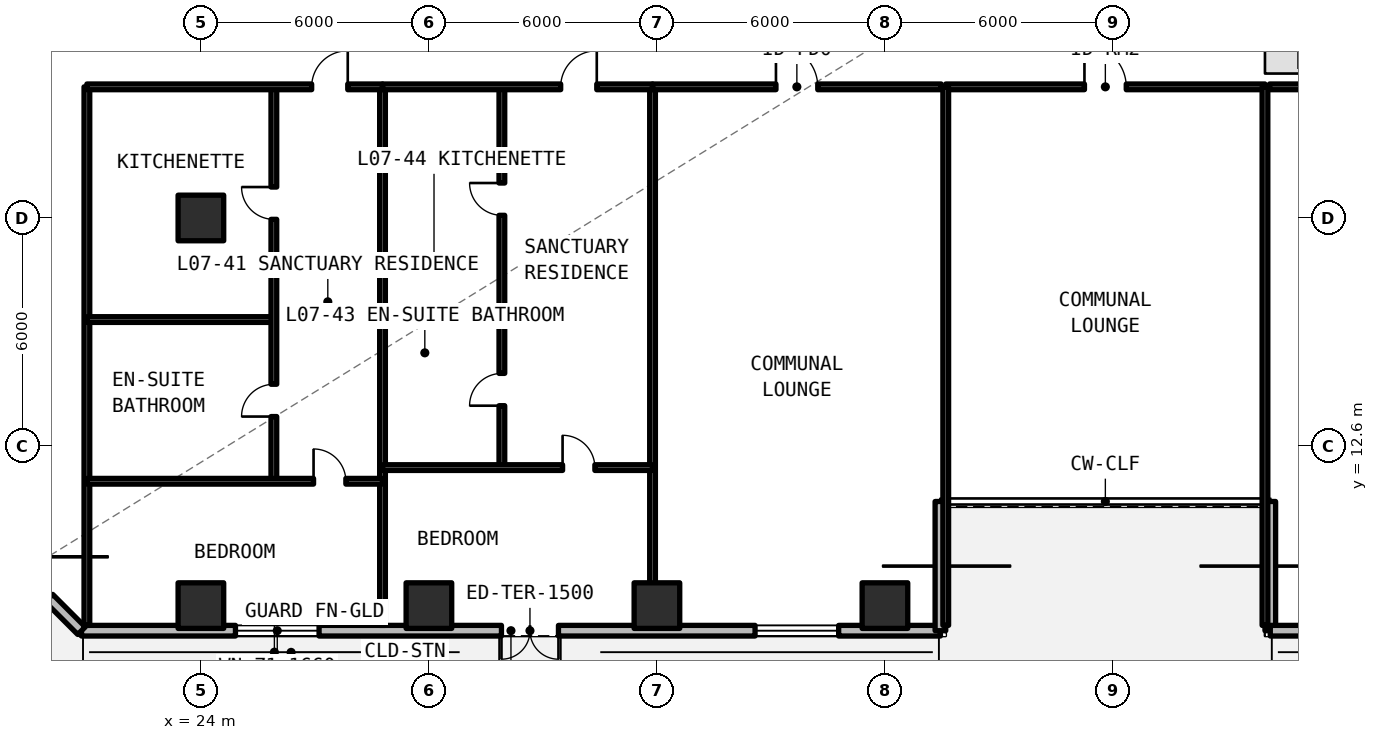
"""IFC4 building model, lengths in metres.
Left out: names, types, materials, properties, quantities, classifications, styles, units other than length and angle.
Written with IfcOpenShell. Run it as: python <this file> out.ifc"""

import sys

from ifc_helpers import new_model, si_unit, direction, frame, frame_2d, origin, origin_2d, place, context, subcontext, project, spatial, rectangle, extrude, element, fill, save


model = new_model("IFC4")
c1 = context("Model", 3, precision=1e-05, world=origin(), true_north=direction((0.0, 1.0)))
c2 = subcontext(c1, "Body", "Model", "MODEL_VIEW")
j1 = project(units=[si_unit("LENGTHUNIT", "METRE"), si_unit("PLANEANGLEUNIT", "RADIAN")], contexts=[c1])
p1 = place(None, origin())
s1 = spatial("IfcSite", under=j1, at=p1, CompositionType="ELEMENT")
p2 = place(p1, origin())
s2 = spatial("IfcBuilding", under=s1, at=p2, CompositionType="ELEMENT")
p3 = place(p2, frame((0.0, 0.0, 29.04)))
s3 = spatial("IfcBuildingStorey", under=s2, at=p3, CompositionType="ELEMENT", Elevation=29.04)
p4 = place(p3, frame((24.0, 18.6, 0.0), z_axis=(0.0, 0.0, 1.0), x_axis=(1.0, 0.0, 0.0)))
e1 = element("IfcColumn", 1, at=p4, inside=s3, PredefinedType="COLUMN", context=c2, shape_type="SweptSolid", body=[
    extrude(rectangle(XDim=1.2, YDim=1.2, at=origin_2d()), origin(), (0.0, 0.0, 1.0), 3.3),
])
for number, where, z_axis, x_axis in (
    (2, (24.0, 8.4, -0.24), (0.0, 0.0, 1.0), (1.0, 0.0, 0.0)),
    (3, (30.0, 8.4, -0.24), (0.0, 0.0, 1.0), (1.0, 0.0, 0.0)),
    (4, (36.0, 8.4, -0.24), (0.0, 0.0, 1.0), (1.0, 0.0, 0.0)),
    (5, (42.0, 8.4, -0.24), (0.0, 0.0, 1.0), (1.0, 0.0, 0.0)),
):
    element("IfcColumn", number, at=place(p3, frame(where, z_axis=z_axis, x_axis=x_axis)), inside=s3, PredefinedType="COLUMN", context=c2, shape_type="SweptSolid", body=[
        extrude(rectangle(XDim=1.2, YDim=1.2, at=origin_2d()), origin(), (0.0, 0.0, 1.0), 3.54),
    ])
p5 = place(p3, frame((20.858, 7.74, 0.0), z_axis=(0.0, 0.0, 1.0), x_axis=(1.0, 0.0, 0.0)))
e6 = element("IfcWall", 6, at=p5, inside=s3, PredefinedType="SOLIDWALL", context=c2, shape_type="SweptSolid", body=[
    extrude(rectangle(XDim=22.602, YDim=0.28, at=frame_2d((11.301, 0.0))), origin(), (0.0, 0.0, 1.0), 3.08),
])
p6 = place(p5, frame((11.051, 0.0, 0.0)))
e7 = element("IfcOpeningElement", 7, at=p6, cuts=e6, PredefinedType="OPENING", context=c2, shape_type="SweptSolid", body=[
    extrude(rectangle(XDim=1.5, YDim=2.2, at=frame_2d((0.75, 1.1))), frame((0.0, 0.15, 0.0), z_axis=(0.0, -1.0, 0.0), x_axis=(1.0, 0.0, 0.0)), (0.0, 0.0, 1.0), 0.3),
])
p7 = place(p5, frame((4.052, 0.0, 0.78)))
e8 = element("IfcOpeningElement", 8, at=p7, cuts=e6, PredefinedType="OPENING", context=c2, shape_type="SweptSolid", body=[
    extrude(rectangle(XDim=2.2, YDim=1.66, at=frame_2d((1.1, 0.83))), frame((0.0, 0.15, 0.0), z_axis=(0.0, -1.0, 0.0), x_axis=(1.0, 0.0, 0.0)), (0.0, 0.0, 1.0), 0.3),
])
p8 = place(p5, frame((17.724, 0.0, 0.78)))
e9 = element("IfcOpeningElement", 9, at=p8, cuts=e6, PredefinedType="OPENING", context=c2, shape_type="SweptSolid", body=[
    extrude(rectangle(XDim=2.2, YDim=1.66, at=frame_2d((1.1, 0.83))), frame((0.0, 0.15, 0.0), z_axis=(0.0, -1.0, 0.0), x_axis=(1.0, 0.0, 0.0)), (0.0, 0.0, 1.0), 0.3),
])
for number, where, z_axis, x_axis in (
    (10, (43.46, 7.74, 0.0), (0.0, 0.0, 1.0), (0.0, 1.0, 0.0)),
    (11, (52.14, 11.14, 0.0), (0.0, 0.0, 1.0), (0.0, -1.0, 0.0)),
):
    element("IfcWall", number, at=place(p3, frame(where, z_axis=z_axis, x_axis=x_axis)), inside=s3, PredefinedType="SOLIDWALL", context=c2, shape_type="SweptSolid", body=[
        extrude(rectangle(XDim=3.4, YDim=0.28, at=frame_2d((1.7, 0.0))), origin(), (0.0, 0.0, 1.0), 3.08),
    ])
p9 = place(p3, frame((52.14, 7.74, 0.0), z_axis=(0.0, 0.0, 1.0), x_axis=(1.0, 0.0, 0.0)))
e12 = element("IfcWall", 12, at=p9, inside=s3, PredefinedType="SOLIDWALL", context=c2, shape_type="SweptSolid", body=[
    extrude(rectangle(XDim=44.402, YDim=0.28, at=frame_2d((22.201, 0.0))), origin(), (0.0, 0.0, 1.0), 3.08),
])
p10 = place(p9, frame((2.664, 0.0, 0.78)))
e13 = element("IfcOpeningElement", 13, at=p10, cuts=e12, PredefinedType="OPENING", context=c2, shape_type="SweptSolid", body=[
    extrude(rectangle(XDim=2.2, YDim=1.66, at=frame_2d((1.1, 0.83))), frame((0.0, 0.15, 0.0), z_axis=(0.0, -1.0, 0.0), x_axis=(1.0, 0.0, 0.0)), (0.0, 0.0, 1.0), 0.3),
])
p11 = place(p9, frame((8.967, 0.0, 0.78)))
e14 = element("IfcOpeningElement", 14, at=p11, cuts=e12, PredefinedType="OPENING", context=c2, shape_type="SweptSolid", body=[
    extrude(rectangle(XDim=2.2, YDim=1.66, at=frame_2d((1.1, 0.83))), frame((0.0, 0.15, 0.0), z_axis=(0.0, -1.0, 0.0), x_axis=(1.0, 0.0, 0.0)), (0.0, 0.0, 1.0), 0.3),
])
p12 = place(p9, frame((16.566, 0.0, 0.78)))
e15 = element("IfcOpeningElement", 15, at=p12, cuts=e12, PredefinedType="OPENING", context=c2, shape_type="SweptSolid", body=[
    extrude(rectangle(XDim=2.2, YDim=1.66, at=frame_2d((1.1, 0.83))), frame((0.0, 0.15, 0.0), z_axis=(0.0, -1.0, 0.0), x_axis=(1.0, 0.0, 0.0)), (0.0, 0.0, 1.0), 0.3),
])
p13 = place(p9, frame((22.826, 0.0, 0.78)))
e16 = element("IfcOpeningElement", 16, at=p13, cuts=e12, PredefinedType="OPENING", context=c2, shape_type="SweptSolid", body=[
    extrude(rectangle(XDim=2.2, YDim=1.66, at=frame_2d((1.1, 0.83))), frame((0.0, 0.15, 0.0), z_axis=(0.0, -1.0, 0.0), x_axis=(1.0, 0.0, 0.0)), (0.0, 0.0, 1.0), 0.3),
])
p14 = place(p9, frame((32.766, 0.0, 0.78)))
e17 = element("IfcOpeningElement", 17, at=p14, cuts=e12, PredefinedType="OPENING", context=c2, shape_type="SweptSolid", body=[
    extrude(rectangle(XDim=2.2, YDim=1.66, at=frame_2d((1.1, 0.83))), frame((0.0, 0.15, 0.0), z_axis=(0.0, -1.0, 0.0), x_axis=(1.0, 0.0, 0.0)), (0.0, 0.0, 1.0), 0.3),
])
p15 = place(p9, frame((38.548, 0.0, 0.78)))
e18 = element("IfcOpeningElement", 18, at=p15, cuts=e12, PredefinedType="OPENING", context=c2, shape_type="SweptSolid", body=[
    extrude(rectangle(XDim=0.85, YDim=1.65, at=frame_2d((0.425, 0.825))), frame((0.0, 0.15, 0.0), z_axis=(0.0, -1.0, 0.0), x_axis=(1.0, 0.0, 0.0)), (0.0, 0.0, 1.0), 0.3),
])
p16 = place(p9, frame((40.91, 0.0, 0.78)))
e19 = element("IfcOpeningElement", 19, at=p16, cuts=e12, PredefinedType="OPENING", context=c2, shape_type="SweptSolid", body=[
    extrude(rectangle(XDim=2.2, YDim=1.66, at=frame_2d((1.1, 0.83))), frame((0.0, 0.15, 0.0), z_axis=(0.0, -1.0, 0.0), x_axis=(1.0, 0.0, 0.0)), (0.0, 0.0, 1.0), 0.3),
])
p17 = place(p3, frame((16.74, 11.858, 0.0), z_axis=(0.0, 0.0, 1.0), x_axis=(0.707106781187, -0.707106781187, 0.0)))
e20 = element("IfcWall", 20, at=p17, inside=s3, PredefinedType="SOLIDWALL", context=c2, shape_type="SweptSolid", body=[
    extrude(rectangle(XDim=5.824, YDim=0.28, at=frame_2d((2.912, 0.0))), origin(), (0.0, 0.0, 1.0), 3.08),
])
p18 = place(p17, frame((1.212, 0.0, 0.78)))
e21 = element("IfcOpeningElement", 21, at=p18, cuts=e20, PredefinedType="OPENING", context=c2, shape_type="SweptSolid", body=[
    extrude(rectangle(XDim=3.4, YDim=1.66, at=frame_2d((1.7, 0.83))), frame((0.0, 0.15, 0.0), z_axis=(0.0, -1.0, 0.0), x_axis=(1.0, 0.0, 0.0)), (0.0, 0.0, 1.0), 0.3),
])
p19 = place(p3, frame((43.6, 22.05, 0.0), z_axis=(0.0, 0.0, 1.0), x_axis=(1.0, 0.0, 0.0)))
e22 = element("IfcWall", 22, at=p19, inside=s3, PredefinedType="SOLIDWALL", context=c2, shape_type="SweptSolid", body=[
    extrude(rectangle(XDim=8.4, YDim=0.15, at=frame_2d((4.2, 0.0))), origin(), (0.0, 0.0, 1.0), 2.35),
])
p20 = place(p19, frame((3.65, 0.0, 0.0)))
e23 = element("IfcOpeningElement", 23, at=p20, cuts=e22, PredefinedType="OPENING", context=c2, shape_type="SweptSolid", body=[
    extrude(rectangle(XDim=1.1, YDim=2.15, at=frame_2d((0.55, 1.075))), frame((0.0, 0.085, 0.0), z_axis=(0.0, -1.0, 0.0), x_axis=(1.0, 0.0, 0.0)), (0.0, 0.0, 1.0), 0.17),
])
for number, where, z_axis, x_axis in (
    (24, (43.6, 7.88, 0.0), (0.0, 0.0, 1.0), (0.0, 1.0, 0.0)),
    (25, (52.0, 7.88, 0.0), (0.0, 0.0, 1.0), (0.0, 1.0, 0.0)),
    (26, (21.0, 7.88, 0.0), (0.0, 0.0, 1.0), (0.0, 1.0, 0.0)),
    (27, (28.779, 7.88, 0.0), (0.0, 0.0, 1.0), (0.0, 1.0, 0.0)),
):
    element("IfcWall", number, at=place(p3, frame(where, z_axis=z_axis, x_axis=x_axis)), inside=s3, PredefinedType="SOLIDWALL", context=c2, shape_type="SweptSolid", body=[
        extrude(rectangle(XDim=14.17, YDim=0.15, at=frame_2d((7.085, 0.0))), origin(), (0.0, 0.0, 1.0), 2.35),
    ])
p21 = place(p3, frame((21.0, 15.927, 0.0), z_axis=(0.0, 0.0, 1.0), x_axis=(1.0, 0.0, 0.0)))
e28 = element("IfcWall", 28, at=p21, inside=s3, PredefinedType="PARTITIONING", context=c2, shape_type="SweptSolid", body=[
    extrude(rectangle(XDim=4.92, YDim=0.15, at=frame_2d((2.46, 0.0))), origin(), (0.0, 0.0, 1.0), 2.35),
])
p22 = place(p3, frame((25.92, 11.672, 0.0), z_axis=(0.0, 0.0, 1.0), x_axis=(0.0, 1.0, 0.0)))
e29 = element("IfcWall", 29, at=p22, inside=s3, PredefinedType="PARTITIONING", context=c2, shape_type="SweptSolid", body=[
    extrude(rectangle(XDim=10.378, YDim=0.15, at=frame_2d((5.189, 0.0))), origin(), (0.0, 0.0, 1.0), 2.35),
])
p23 = place(p22, frame((1.702, 0.0, 0.0)))
e30 = element("IfcOpeningElement", 30, at=p23, cuts=e29, PredefinedType="OPENING", context=c2, shape_type="SweptSolid", body=[
    extrude(rectangle(XDim=0.85, YDim=2.1, at=frame_2d((0.425, 1.05))), frame((0.0, 0.085, 0.0), z_axis=(0.0, -1.0, 0.0), x_axis=(1.0, 0.0, 0.0)), (0.0, 0.0, 1.0), 0.17),
])
p24 = place(p22, frame((6.891, 0.0, 0.0)))
e31 = element("IfcOpeningElement", 31, at=p24, cuts=e29, PredefinedType="OPENING", context=c2, shape_type="SweptSolid", body=[
    extrude(rectangle(XDim=0.85, YDim=2.1, at=frame_2d((0.425, 1.05))), frame((0.0, 0.085, 0.0), z_axis=(0.0, -1.0, 0.0), x_axis=(1.0, 0.0, 0.0)), (0.0, 0.0, 1.0), 0.17),
])
p25 = place(p3, frame((21.0, 11.672, 0.0), z_axis=(0.0, 0.0, 1.0), x_axis=(1.0, 0.0, 0.0)))
e32 = element("IfcWall", 32, at=p25, inside=s3, PredefinedType="PARTITIONING", context=c2, shape_type="SweptSolid", body=[
    extrude(rectangle(XDim=7.779, YDim=0.15, at=frame_2d((3.89, 0.0))), origin(), (0.0, 0.0, 1.0), 2.35),
])
p26 = place(p25, frame((5.965, 0.0, 0.0)))
e33 = element("IfcOpeningElement", 33, at=p26, cuts=e32, PredefinedType="OPENING", context=c2, shape_type="SweptSolid", body=[
    extrude(rectangle(XDim=0.85, YDim=2.1, at=frame_2d((0.425, 1.05))), frame((0.0, 0.085, 0.0), z_axis=(0.0, -1.0, 0.0), x_axis=(1.0, 0.0, 0.0)), (0.0, 0.0, 1.0), 0.17),
])
p27 = place(p3, frame((21.0, 22.05, 0.0), z_axis=(0.0, 0.0, 1.0), x_axis=(1.0, 0.0, 0.0)))
e34 = element("IfcWall", 34, at=p27, inside=s3, PredefinedType="SOLIDWALL", context=c2, shape_type="SweptSolid", body=[
    extrude(rectangle(XDim=7.779, YDim=0.15, at=frame_2d((3.89, 0.0))), origin(), (0.0, 0.0, 1.0), 2.35),
])
p28 = place(p27, frame((5.915, 0.0, 0.0)))
e35 = element("IfcOpeningElement", 35, at=p28, cuts=e34, PredefinedType="OPENING", context=c2, shape_type="SweptSolid", body=[
    extrude(rectangle(XDim=0.95, YDim=2.15, at=frame_2d((0.475, 1.075))), frame((0.0, 0.085, 0.0), z_axis=(0.0, -1.0, 0.0), x_axis=(1.0, 0.0, 0.0)), (0.0, 0.0, 1.0), 0.17),
])
p29 = place(p3, frame((35.885, 7.88, 0.0), z_axis=(0.0, 0.0, 1.0), x_axis=(0.0, 1.0, 0.0)))
e36 = element("IfcWall", 36, at=p29, inside=s3, PredefinedType="SOLIDWALL", context=c2, shape_type="SweptSolid", body=[
    extrude(rectangle(XDim=14.17, YDim=0.15, at=frame_2d((7.085, 0.0))), origin(), (0.0, 0.0, 1.0), 2.35),
])
p30 = place(p3, frame((28.779, 16.139, 0.0), z_axis=(0.0, 0.0, 1.0), x_axis=(1.0, 0.0, 0.0)))
e37 = element("IfcWall", 37, at=p30, inside=s3, PredefinedType="PARTITIONING", context=c2, shape_type="SweptSolid", body=[
    extrude(rectangle(XDim=3.141, YDim=0.15, at=frame_2d((1.57, 0.0))), origin(), (0.0, 0.0, 1.0), 2.35),
])
p31 = place(p3, frame((31.92, 12.032, 0.0), z_axis=(0.0, 0.0, 1.0), x_axis=(0.0, 1.0, 0.0)))
e38 = element("IfcWall", 38, at=p31, inside=s3, PredefinedType="PARTITIONING", context=c2, shape_type="SweptSolid", body=[
    extrude(rectangle(XDim=10.018, YDim=0.15, at=frame_2d((5.009, 0.0))), origin(), (0.0, 0.0, 1.0), 2.35),
])
p32 = place(p31, frame((1.629, 0.0, 0.0)))
e39 = element("IfcOpeningElement", 39, at=p32, cuts=e38, PredefinedType="OPENING", context=c2, shape_type="SweptSolid", body=[
    extrude(rectangle(XDim=0.85, YDim=2.1, at=frame_2d((0.425, 1.05))), frame((0.0, 0.085, 0.0), z_axis=(0.0, -1.0, 0.0), x_axis=(1.0, 0.0, 0.0)), (0.0, 0.0, 1.0), 0.17),
])
p33 = place(p31, frame((6.638, 0.0, 0.0)))
e40 = element("IfcOpeningElement", 40, at=p33, cuts=e38, PredefinedType="OPENING", context=c2, shape_type="SweptSolid", body=[
    extrude(rectangle(XDim=0.85, YDim=2.1, at=frame_2d((0.425, 1.05))), frame((0.0, 0.085, 0.0), z_axis=(0.0, -1.0, 0.0), x_axis=(1.0, 0.0, 0.0)), (0.0, 0.0, 1.0), 0.17),
])
p34 = place(p3, frame((28.779, 12.032, 0.0), z_axis=(0.0, 0.0, 1.0), x_axis=(1.0, 0.0, 0.0)))
e41 = element("IfcWall", 41, at=p34, inside=s3, PredefinedType="PARTITIONING", context=c2, shape_type="SweptSolid", body=[
    extrude(rectangle(XDim=7.105, YDim=0.15, at=frame_2d((3.553, 0.0))), origin(), (0.0, 0.0, 1.0), 2.35),
])
p35 = place(p34, frame((4.738, 0.0, 0.0)))
e42 = element("IfcOpeningElement", 42, at=p35, cuts=e41, PredefinedType="OPENING", context=c2, shape_type="SweptSolid", body=[
    extrude(rectangle(XDim=0.85, YDim=2.1, at=frame_2d((0.425, 1.05))), frame((0.0, 0.085, 0.0), z_axis=(0.0, -1.0, 0.0), x_axis=(1.0, 0.0, 0.0)), (0.0, 0.0, 1.0), 0.17),
])
p36 = place(p3, frame((28.779, 22.05, 0.0), z_axis=(0.0, 0.0, 1.0), x_axis=(1.0, 0.0, 0.0)))
e43 = element("IfcWall", 43, at=p36, inside=s3, PredefinedType="SOLIDWALL", context=c2, shape_type="SweptSolid", body=[
    extrude(rectangle(XDim=7.105, YDim=0.15, at=frame_2d((3.553, 0.0))), origin(), (0.0, 0.0, 1.0), 2.35),
])
p37 = place(p36, frame((4.688, 0.0, 0.0)))
e44 = element("IfcOpeningElement", 44, at=p37, cuts=e43, PredefinedType="OPENING", context=c2, shape_type="SweptSolid", body=[
    extrude(rectangle(XDim=0.95, YDim=2.15, at=frame_2d((0.475, 1.075))), frame((0.0, 0.085, 0.0), z_axis=(0.0, -1.0, 0.0), x_axis=(1.0, 0.0, 0.0)), (0.0, 0.0, 1.0), 0.17),
])
p38 = place(p3, frame((35.885, 22.05, 0.0), z_axis=(0.0, 0.0, 1.0), x_axis=(1.0, 0.0, 0.0)))
e45 = element("IfcWall", 45, at=p38, inside=s3, PredefinedType="SOLIDWALL", context=c2, shape_type="SweptSolid", body=[
    extrude(rectangle(XDim=7.595, YDim=0.15, at=frame_2d((3.798, 0.0))), origin(), (0.0, 0.0, 1.0), 2.35),
])
p39 = place(p38, frame((3.248, 0.0, 0.0)))
e46 = element("IfcOpeningElement", 46, at=p39, cuts=e45, PredefinedType="OPENING", context=c2, shape_type="SweptSolid", body=[
    extrude(rectangle(XDim=1.1, YDim=2.15, at=frame_2d((0.55, 1.075))), frame((0.0, 0.085, 0.0), z_axis=(0.0, -1.0, 0.0), x_axis=(1.0, 0.0, 0.0)), (0.0, 0.0, 1.0), 0.17),
])
p40 = place(p3, frame((52.12, 22.05, 0.0), z_axis=(0.0, 0.0, 1.0), x_axis=(1.0, 0.0, 0.0)))
e47 = element("IfcWall", 47, at=p40, inside=s3, PredefinedType="SOLIDWALL", context=c2, shape_type="SweptSolid", body=[
    extrude(rectangle(XDim=6.288, YDim=0.15, at=frame_2d((3.144, 0.0))), origin(), (0.0, 0.0, 1.0), 2.35),
])
p41 = place(p40, frame((2.669, 0.0, 0.0)))
e48 = element("IfcOpeningElement", 48, at=p41, cuts=e47, PredefinedType="OPENING", context=c2, shape_type="SweptSolid", body=[
    extrude(rectangle(XDim=0.95, YDim=2.15, at=frame_2d((0.475, 1.075))), frame((0.0, 0.085, 0.0), z_axis=(0.0, -1.0, 0.0), x_axis=(1.0, 0.0, 0.0)), (0.0, 0.0, 1.0), 0.17),
])
p42 = place(p6, frame((1.5, 0.0, 0.0), z_axis=(0.0, 0.0, 1.0), x_axis=(-1.0, 0.0, 0.0)))
e49 = element("IfcDoor", 49, at=p42, inside=s3, OperationType="SINGLE_SWING_RIGHT", PredefinedType="DOOR", context=c2, shape_type="SweptSolid", body=[
    extrude(rectangle(XDim=1.5, YDim=2.2, at=frame_2d((0.75, 1.1))), frame((0.0, 0.025, 0.0), z_axis=(0.0, -1.0, 0.0), x_axis=(1.0, 0.0, 0.0)), (0.0, 0.0, 1.0), 0.05),
])
fill(e7, e49)
p43 = place(p7, origin())
e50 = element("IfcWindow", 50, at=p43, inside=s3, PartitioningType="SINGLE_PANEL", PredefinedType="WINDOW", context=c2, shape_type="SweptSolid", body=[
    extrude(rectangle(XDim=2.2, YDim=1.66, at=frame_2d((1.1, 0.83))), frame((0.0, 0.03, 0.0), z_axis=(0.0, -1.0, 0.0), x_axis=(1.0, 0.0, 0.0)), (0.0, 0.0, 1.0), 0.06),
])
fill(e8, e50)
p44 = place(p8, origin())
e51 = element("IfcWindow", 51, at=p44, inside=s3, PartitioningType="SINGLE_PANEL", PredefinedType="WINDOW", context=c2, shape_type="SweptSolid", body=[
    extrude(rectangle(XDim=2.2, YDim=1.66, at=frame_2d((1.1, 0.83))), frame((0.0, 0.03, 0.0), z_axis=(0.0, -1.0, 0.0), x_axis=(1.0, 0.0, 0.0)), (0.0, 0.0, 1.0), 0.06),
])
fill(e9, e51)
p45 = place(p20, origin())
e52 = element("IfcDoor", 52, at=p45, inside=s3, OperationType="SINGLE_SWING_LEFT", PredefinedType="DOOR", context=c2, shape_type="SweptSolid", body=[
    extrude(rectangle(XDim=1.1, YDim=2.15, at=frame_2d((0.55, 1.075))), frame((0.0, 0.025, 0.0), z_axis=(0.0, -1.0, 0.0), x_axis=(1.0, 0.0, 0.0)), (0.0, 0.0, 1.0), 0.05),
])
fill(e23, e52)
p46 = place(p23, origin())
e53 = element("IfcDoor", 53, at=p46, inside=s3, OperationType="SINGLE_SWING_LEFT", PredefinedType="DOOR", context=c2, shape_type="SweptSolid", body=[
    extrude(rectangle(XDim=0.85, YDim=2.1, at=frame_2d((0.425, 1.05))), frame((0.0, 0.025, 0.0), z_axis=(0.0, -1.0, 0.0), x_axis=(1.0, 0.0, 0.0)), (0.0, 0.0, 1.0), 0.05),
])
fill(e30, e53)
p47 = place(p24, origin())
e54 = element("IfcDoor", 54, at=p47, inside=s3, OperationType="SINGLE_SWING_RIGHT", PredefinedType="DOOR", context=c2, shape_type="SweptSolid", body=[
    extrude(rectangle(XDim=0.85, YDim=2.1, at=frame_2d((0.425, 1.05))), frame((0.0, 0.025, 0.0), z_axis=(0.0, -1.0, 0.0), x_axis=(1.0, 0.0, 0.0)), (0.0, 0.0, 1.0), 0.05),
])
fill(e31, e54)
p48 = place(p26, origin())
e55 = element("IfcDoor", 55, at=p48, inside=s3, OperationType="SINGLE_SWING_LEFT", PredefinedType="DOOR", context=c2, shape_type="SweptSolid", body=[
    extrude(rectangle(XDim=0.85, YDim=2.1, at=frame_2d((0.425, 1.05))), frame((0.0, 0.025, 0.0), z_axis=(0.0, -1.0, 0.0), x_axis=(1.0, 0.0, 0.0)), (0.0, 0.0, 1.0), 0.05),
])
fill(e33, e55)
p49 = place(p28, origin())
e56 = element("IfcDoor", 56, at=p49, inside=s3, OperationType="SINGLE_SWING_RIGHT", PredefinedType="DOOR", context=c2, shape_type="SweptSolid", body=[
    extrude(rectangle(XDim=0.95, YDim=2.15, at=frame_2d((0.475, 1.075))), frame((0.0, 0.025, 0.0), z_axis=(0.0, -1.0, 0.0), x_axis=(1.0, 0.0, 0.0)), (0.0, 0.0, 1.0), 0.05),
])
fill(e35, e56)
p50 = place(p32, origin())
e57 = element("IfcDoor", 57, at=p50, inside=s3, OperationType="SINGLE_SWING_LEFT", PredefinedType="DOOR", context=c2, shape_type="SweptSolid", body=[
    extrude(rectangle(XDim=0.85, YDim=2.1, at=frame_2d((0.425, 1.05))), frame((0.0, 0.025, 0.0), z_axis=(0.0, -1.0, 0.0), x_axis=(1.0, 0.0, 0.0)), (0.0, 0.0, 1.0), 0.05),
])
fill(e39, e57)
p51 = place(p33, origin())
e58 = element("IfcDoor", 58, at=p51, inside=s3, OperationType="SINGLE_SWING_RIGHT", PredefinedType="DOOR", context=c2, shape_type="SweptSolid", body=[
    extrude(rectangle(XDim=0.85, YDim=2.1, at=frame_2d((0.425, 1.05))), frame((0.0, 0.025, 0.0), z_axis=(0.0, -1.0, 0.0), x_axis=(1.0, 0.0, 0.0)), (0.0, 0.0, 1.0), 0.05),
])
fill(e40, e58)
p52 = place(p35, origin())
e59 = element("IfcDoor", 59, at=p52, inside=s3, OperationType="SINGLE_SWING_LEFT", PredefinedType="DOOR", context=c2, shape_type="SweptSolid", body=[
    extrude(rectangle(XDim=0.85, YDim=2.1, at=frame_2d((0.425, 1.05))), frame((0.0, 0.025, 0.0), z_axis=(0.0, -1.0, 0.0), x_axis=(1.0, 0.0, 0.0)), (0.0, 0.0, 1.0), 0.05),
])
fill(e42, e59)
p53 = place(p37, origin())
e60 = element("IfcDoor", 60, at=p53, inside=s3, OperationType="SINGLE_SWING_RIGHT", PredefinedType="DOOR", context=c2, shape_type="SweptSolid", body=[
    extrude(rectangle(XDim=0.95, YDim=2.15, at=frame_2d((0.475, 1.075))), frame((0.0, 0.025, 0.0), z_axis=(0.0, -1.0, 0.0), x_axis=(1.0, 0.0, 0.0)), (0.0, 0.0, 1.0), 0.05),
])
fill(e44, e60)
p54 = place(p39, origin())
e61 = element("IfcDoor", 61, at=p54, inside=s3, OperationType="SINGLE_SWING_LEFT", PredefinedType="DOOR", context=c2, shape_type="SweptSolid", body=[
    extrude(rectangle(XDim=1.1, YDim=2.15, at=frame_2d((0.55, 1.075))), frame((0.0, 0.025, 0.0), z_axis=(0.0, -1.0, 0.0), x_axis=(1.0, 0.0, 0.0)), (0.0, 0.0, 1.0), 0.05),
])
fill(e46, e61)
save(model, sys.argv[1])
